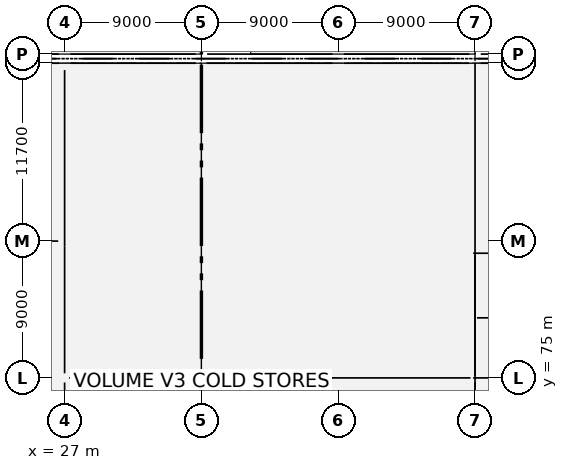
"""IFC4 building model, lengths in metres.
Left out: names, types, materials, properties, quantities, classifications, styles, units other than length and angle.
Written with IfcOpenShell. Run it as: python <this file> out.ifc"""

import sys

from ifc_helpers import new_model, si_unit, direction, frame, frame_2d, origin, origin_2d, place, context, subcontext, project, spatial, rectangle, extrude, element, fill, save


model = new_model("IFC4")
c1 = context("Model", 3, precision=1e-05, world=origin(), true_north=direction((0.0, 1.0)))
c2 = subcontext(c1, "Body", "Model", "MODEL_VIEW")
j1 = project(units=[si_unit("LENGTHUNIT", "METRE"), si_unit("PLANEANGLEUNIT", "RADIAN")], contexts=[c1])
p1 = place(None, origin())
s1 = spatial("IfcSite", under=j1, at=p1, CompositionType="ELEMENT")
p2 = place(p1, origin())
s2 = spatial("IfcBuilding", under=s1, at=p2, CompositionType="ELEMENT")
p3 = place(p2, origin())
s3 = spatial("IfcBuildingStorey", under=s2, at=p3, CompositionType="ELEMENT", Elevation=0.0)
for number, where, z_axis, x_axis in (
    (1, (27.0, 75.0, -0.5), (0.0, 0.0, 1.0), (1.0, 0.0, 0.0)),
    (2, (27.0, 84.0, -0.5), (0.0, 0.0, 1.0), (1.0, 0.0, 0.0)),
):
    element("IfcColumn", number, at=place(p3, frame(where, z_axis=z_axis, x_axis=x_axis)), inside=s3, PredefinedType="COLUMN", context=c2, shape_type="SweptSolid", body=[
        extrude(rectangle(XDim=0.75, YDim=0.75, at=origin_2d()), origin(), (0.0, 0.0, 1.0), 6.8),
    ])
for number, where, z_axis, x_axis in (
    (3, (27.0, 95.7, -0.5), (0.0, 0.0, 1.0), (1.0, 0.0, 0.0)),
    (4, (27.0, 96.3, -0.5), (0.0, 0.0, 1.0), (1.0, 0.0, 0.0)),
):
    element("IfcColumn", number, at=place(p3, frame(where, z_axis=z_axis, x_axis=x_axis)), inside=s3, PredefinedType="COLUMN", context=c2, shape_type="SweptSolid", body=[
        extrude(rectangle(XDim=0.75, YDim=0.55, at=origin_2d()), origin(), (0.0, 0.0, 1.0), 6.8),
    ])
for number, where, z_axis, x_axis in (
    (5, (36.0, 75.0, -0.5), (0.0, 0.0, 1.0), (1.0, 0.0, 0.0)),
    (6, (36.0, 84.0, -0.5), (0.0, 0.0, 1.0), (1.0, 0.0, 0.0)),
):
    element("IfcColumn", number, at=place(p3, frame(where, z_axis=z_axis, x_axis=x_axis)), inside=s3, PredefinedType="COLUMN", context=c2, shape_type="SweptSolid", body=[
        extrude(rectangle(XDim=0.75, YDim=0.75, at=origin_2d()), origin(), (0.0, 0.0, 1.0), 6.8),
    ])
for number, where, z_axis, x_axis in (
    (7, (36.0, 95.7, -0.5), (0.0, 0.0, 1.0), (1.0, 0.0, 0.0)),
    (8, (36.0, 96.3, -0.5), (0.0, 0.0, 1.0), (1.0, 0.0, 0.0)),
):
    element("IfcColumn", number, at=place(p3, frame(where, z_axis=z_axis, x_axis=x_axis)), inside=s3, PredefinedType="COLUMN", context=c2, shape_type="SweptSolid", body=[
        extrude(rectangle(XDim=0.75, YDim=0.55, at=origin_2d()), origin(), (0.0, 0.0, 1.0), 6.8),
    ])
for number, where, z_axis, x_axis in (
    (9, (45.0, 75.0, -0.5), (0.0, 0.0, 1.0), (1.0, 0.0, 0.0)),
    (10, (45.0, 84.0, -0.5), (0.0, 0.0, 1.0), (1.0, 0.0, 0.0)),
):
    element("IfcColumn", number, at=place(p3, frame(where, z_axis=z_axis, x_axis=x_axis)), inside=s3, PredefinedType="COLUMN", context=c2, shape_type="SweptSolid", body=[
        extrude(rectangle(XDim=0.75, YDim=0.75, at=origin_2d()), origin(), (0.0, 0.0, 1.0), 6.8),
    ])
for number, where, z_axis, x_axis in (
    (11, (45.0, 95.7, -0.5), (0.0, 0.0, 1.0), (1.0, 0.0, 0.0)),
    (12, (45.0, 96.3, -0.5), (0.0, 0.0, 1.0), (1.0, 0.0, 0.0)),
):
    element("IfcColumn", number, at=place(p3, frame(where, z_axis=z_axis, x_axis=x_axis)), inside=s3, PredefinedType="COLUMN", context=c2, shape_type="SweptSolid", body=[
        extrude(rectangle(XDim=0.75, YDim=0.55, at=origin_2d()), origin(), (0.0, 0.0, 1.0), 6.8),
    ])
for number, where, z_axis, x_axis in (
    (13, (54.0, 75.0, -0.5), (0.0, 0.0, 1.0), (1.0, 0.0, 0.0)),
    (14, (54.0, 84.0, -0.5), (0.0, 0.0, 1.0), (1.0, 0.0, 0.0)),
):
    element("IfcColumn", number, at=place(p3, frame(where, z_axis=z_axis, x_axis=x_axis)), inside=s3, PredefinedType="COLUMN", context=c2, shape_type="SweptSolid", body=[
        extrude(rectangle(XDim=0.75, YDim=0.75, at=origin_2d()), origin(), (0.0, 0.0, 1.0), 6.8),
    ])
for number, where, z_axis, x_axis in (
    (15, (54.0, 95.7, -0.5), (0.0, 0.0, 1.0), (1.0, 0.0, 0.0)),
    (16, (54.0, 96.3, -0.5), (0.0, 0.0, 1.0), (1.0, 0.0, 0.0)),
):
    element("IfcColumn", number, at=place(p3, frame(where, z_axis=z_axis, x_axis=x_axis)), inside=s3, PredefinedType="COLUMN", context=c2, shape_type="SweptSolid", body=[
        extrude(rectangle(XDim=0.75, YDim=0.55, at=origin_2d()), origin(), (0.0, 0.0, 1.0), 6.8),
    ])
for number, where, z_axis, x_axis in (
    (17, (18.375, 95.7, 0.0), (0.0, 0.0, 1.0), (1.0, 0.0, 0.0)),
    (18, (27.375, 95.7, 0.0), (0.0, 0.0, 1.0), (1.0, 0.0, 0.0)),
    (19, (36.375, 95.7, 0.0), (0.0, 0.0, 1.0), (1.0, 0.0, 0.0)),
    (20, (45.375, 95.7, 0.0), (0.0, 0.0, 1.0), (1.0, 0.0, 0.0)),
    (21, (54.375, 95.7, 0.0), (0.0, 0.0, 1.0), (1.0, 0.0, 0.0)),
):
    element("IfcWall", number, at=place(p3, frame(where, z_axis=z_axis, x_axis=x_axis)), inside=s3, PredefinedType="SOLIDWALL", context=c2, shape_type="SweptSolid", body=[
        extrude(rectangle(XDim=8.25, YDim=0.38, at=frame_2d((4.125, 0.0))), origin(), (0.0, 0.0, 1.0), 5.08),
    ])
p4 = place(p3, frame((18.375, 96.3, 0.0), z_axis=(0.0, 0.0, 1.0), x_axis=(1.0, 0.0, 0.0)))
e22 = element("IfcWall", 22, at=p4, inside=s3, PredefinedType="SOLIDWALL", context=c2, shape_type="SweptSolid", body=[
    extrude(rectangle(XDim=8.25, YDim=0.38, at=frame_2d((4.125, 0.0))), origin(), (0.0, 0.0, 1.0), 5.08),
])
p5 = place(p4, frame((3.325, 0.0, 3.59)))
e23 = element("IfcOpeningElement", 23, at=p5, cuts=e22, PredefinedType="OPENING", context=c2, shape_type="SweptSolid", body=[
    extrude(rectangle(XDim=1.6, YDim=1.45, at=frame_2d((0.8, 0.725))), frame((0.0, 0.2, 0.0), z_axis=(0.0, -1.0, 0.0), x_axis=(1.0, 0.0, 0.0)), (0.0, 0.0, 1.0), 0.4),
])
p6 = place(p3, frame((27.375, 96.3, 0.0), z_axis=(0.0, 0.0, 1.0), x_axis=(1.0, 0.0, 0.0)))
e24 = element("IfcWall", 24, at=p6, inside=s3, PredefinedType="SOLIDWALL", context=c2, shape_type="SweptSolid", body=[
    extrude(rectangle(XDim=8.25, YDim=0.38, at=frame_2d((4.125, 0.0))), origin(), (0.0, 0.0, 1.0), 5.08),
])
p7 = place(p3, frame((36.375, 96.3, 0.0), z_axis=(0.0, 0.0, 1.0), x_axis=(1.0, 0.0, 0.0)))
e25 = element("IfcWall", 25, at=p7, inside=s3, PredefinedType="SOLIDWALL", context=c2, shape_type="SweptSolid", body=[
    extrude(rectangle(XDim=8.25, YDim=0.38, at=frame_2d((4.125, 0.0))), origin(), (0.0, 0.0, 1.0), 5.08),
])
p8 = place(p7, frame((3.325, 0.0, 3.34)))
e26 = element("IfcOpeningElement", 26, at=p8, cuts=e25, PredefinedType="OPENING", context=c2, shape_type="SweptSolid", body=[
    extrude(rectangle(XDim=1.6, YDim=1.45, at=frame_2d((0.8, 0.725))), frame((0.0, 0.2, 0.0), z_axis=(0.0, -1.0, 0.0), x_axis=(1.0, 0.0, 0.0)), (0.0, 0.0, 1.0), 0.4),
])
p9 = place(p3, frame((45.375, 96.3, 0.0), z_axis=(0.0, 0.0, 1.0), x_axis=(1.0, 0.0, 0.0)))
e27 = element("IfcWall", 27, at=p9, inside=s3, PredefinedType="SOLIDWALL", context=c2, shape_type="SweptSolid", body=[
    extrude(rectangle(XDim=8.25, YDim=0.38, at=frame_2d((4.125, 0.0))), origin(), (0.0, 0.0, 1.0), 5.08),
])
p10 = place(p3, frame((54.375, 96.3, 0.0), z_axis=(0.0, 0.0, 1.0), x_axis=(1.0, 0.0, 0.0)))
e28 = element("IfcWall", 28, at=p10, inside=s3, PredefinedType="SOLIDWALL", context=c2, shape_type="SweptSolid", body=[
    extrude(rectangle(XDim=8.25, YDim=0.38, at=frame_2d((4.125, 0.0))), origin(), (0.0, 0.0, 1.0), 5.08),
])
p11 = place(p10, frame((3.325, 0.0, 3.59)))
e29 = element("IfcOpeningElement", 29, at=p11, cuts=e28, PredefinedType="OPENING", context=c2, shape_type="SweptSolid", body=[
    extrude(rectangle(XDim=1.6, YDim=1.45, at=frame_2d((0.8, 0.725))), frame((0.0, 0.2, 0.0), z_axis=(0.0, -1.0, 0.0), x_axis=(1.0, 0.0, 0.0)), (0.0, 0.0, 1.0), 0.4),
])
p12 = place(p3, frame((53.875, 75.0, -0.5), z_axis=(0.0, 0.0, 1.0), x_axis=(1.0, 0.0, 0.0)))
e30 = element("IfcWall", 30, at=p12, inside=s3, PredefinedType="SOLIDWALL", context=c2, shape_type="SweptSolid", body=[
    extrude(rectangle(XDim=9.25, YDim=0.25, at=frame_2d((4.625, 0.0))), origin(), (0.0, 0.0, 1.0), 6.8),
])
p13 = place(p3, frame((53.875, 83.2, -0.5), z_axis=(0.0, 0.0, 1.0), x_axis=(1.0, 0.0, 0.0)))
e31 = element("IfcWall", 31, at=p13, inside=s3, PredefinedType="SOLIDWALL", context=c2, shape_type="SweptSolid", body=[
    extrude(rectangle(XDim=9.25, YDim=0.25, at=frame_2d((4.625, 0.0))), origin(), (0.0, 0.0, 1.0), 6.8),
])
p14 = place(p13, frame((5.775, 0.0, 0.5)))
e32 = element("IfcOpeningElement", 32, at=p14, cuts=e31, PredefinedType="OPENING", context=c2, shape_type="SweptSolid", body=[
    extrude(rectangle(XDim=1.6, YDim=2.2, at=frame_2d((0.8, 1.1))), frame((0.0, 0.135, 0.0), z_axis=(0.0, -1.0, 0.0), x_axis=(1.0, 0.0, 0.0)), (0.0, 0.0, 1.0), 0.27),
])
p15 = place(p3, frame((54.0, 75.125, -0.5), z_axis=(0.0, 0.0, 1.0), x_axis=(0.0, 1.0, 0.0)))
e33 = element("IfcWall", 33, at=p15, inside=s3, PredefinedType="SOLIDWALL", context=c2, shape_type="SweptSolid", body=[
    extrude(rectangle(XDim=7.95, YDim=0.25, at=frame_2d((3.975, 0.0))), origin(), (0.0, 0.0, 1.0), 6.8),
])
p16 = place(p15, frame((1.15, 0.0, 0.5)))
e34 = element("IfcOpeningElement", 34, at=p16, cuts=e33, PredefinedType="OPENING", context=c2, shape_type="SweptSolid", body=[
    extrude(rectangle(XDim=1.2, YDim=2.2, at=frame_2d((0.6, 1.1))), frame((0.0, 0.135, 0.0), z_axis=(0.0, -1.0, 0.0), x_axis=(1.0, 0.0, 0.0)), (0.0, 0.0, 1.0), 0.27),
])
p17 = place(p3, frame((54.125, 78.95, -0.5), z_axis=(0.0, 0.0, 1.0), x_axis=(1.0, 0.0, 0.0)))
e35 = element("IfcWall", 35, at=p17, inside=s3, PredefinedType="SOLIDWALL", context=c2, shape_type="SweptSolid", body=[
    extrude(rectangle(XDim=8.75, YDim=0.25, at=frame_2d((4.375, 0.0))), origin(), (0.0, 0.0, 1.0), 6.8),
])
p18 = place(p3, frame((18.42, 84.0, -0.5), z_axis=(0.0, 0.0, 1.0), x_axis=(1.0, 0.0, 0.0)))
e36 = element("IfcWall", 36, at=p18, inside=s3, PredefinedType="SHEAR", context=c2, shape_type="SweptSolid", body=[
    extrude(rectangle(XDim=8.16, YDim=0.33, at=frame_2d((4.08, 0.0))), origin(), (0.0, 0.0, 1.0), 6.48),
])
p19 = place(p3, frame((27.0, 72.2, 0.0), z_axis=(0.0, 0.0, 1.0), x_axis=(0.0, 1.0, 0.0)))
e37 = element("IfcWall", 37, at=p19, inside=s3, PredefinedType="PARTITIONING", context=c2, shape_type="SweptSolid", body=[
    extrude(rectangle(XDim=2.5, YDim=0.1, at=frame_2d((1.25, 0.0))), origin(), (0.0, 0.0, 1.0), 5.18),
])
p20 = place(p19, frame((0.78, 0.0, 0.0)))
e38 = element("IfcOpeningElement", 38, at=p20, cuts=e37, PredefinedType="OPENING", context=c2, shape_type="SweptSolid", body=[
    extrude(rectangle(XDim=0.94, YDim=2.14, at=frame_2d((0.47, 1.07))), frame((0.0, 0.06, 0.0), z_axis=(0.0, -1.0, 0.0), x_axis=(1.0, 0.0, 0.0)), (0.0, 0.0, 1.0), 0.12),
])
p21 = place(p3, frame((27.0, 75.3, 0.0), z_axis=(0.0, 0.0, 1.0), x_axis=(0.0, 1.0, 0.0)))
e39 = element("IfcWall", 39, at=p21, inside=s3, PredefinedType="STANDARD", context=c2, shape_type="SweptSolid", body=[
    extrude(rectangle(XDim=8.325, YDim=0.195, at=frame_2d((4.163, 0.0))), origin(), (0.0, 0.0, 1.0), 5.18),
])
p22 = place(p3, frame((27.3, 75.0, 0.0), z_axis=(0.0, 0.0, 1.0), x_axis=(1.0, 0.0, 0.0)))
e40 = element("IfcWall", 40, at=p22, inside=s3, PredefinedType="STANDARD", context=c2, shape_type="SweptSolid", body=[
    extrude(rectangle(XDim=26.4, YDim=0.195, at=frame_2d((13.2, 0.0))), origin(), (0.0, 0.0, 1.0), 5.13),
])
p23 = place(p22, frame((12.125, 0.0, 0.0)))
e41 = element("IfcOpeningElement", 41, at=p23, cuts=e40, PredefinedType="OPENING", context=c2, shape_type="SweptSolid", body=[
    extrude(rectangle(XDim=2.15, YDim=2.55, at=frame_2d((1.075, 1.275))), frame((0.0, 0.107, 0.0), z_axis=(0.0, -1.0, 0.0), x_axis=(1.0, 0.0, 0.0)), (0.0, 0.0, 1.0), 0.215),
])
p24 = place(p3, frame((54.0, 72.2, 0.0), z_axis=(0.0, 0.0, 1.0), x_axis=(0.0, 1.0, 0.0)))
e42 = element("IfcWall", 42, at=p24, inside=s3, PredefinedType="PARTITIONING", context=c2, shape_type="SweptSolid", body=[
    extrude(rectangle(XDim=2.5, YDim=0.14, at=frame_2d((1.25, 0.0))), origin(), (0.0, 0.0, 1.0), 5.18),
])
p25 = place(p24, frame((0.78, 0.0, 0.0)))
e43 = element("IfcOpeningElement", 43, at=p25, cuts=e42, PredefinedType="OPENING", context=c2, shape_type="SweptSolid", body=[
    extrude(rectangle(XDim=0.94, YDim=2.14, at=frame_2d((0.47, 1.07))), frame((0.0, 0.08, 0.0), z_axis=(0.0, -1.0, 0.0), x_axis=(1.0, 0.0, 0.0)), (0.0, 0.0, 1.0), 0.16),
])
p26 = place(p3, frame((27.0, 83.625, 0.0), z_axis=(0.0, 0.0, 1.0), x_axis=(0.0, 1.0, 0.0)))
e44 = element("IfcWall", 44, at=p26, inside=s3, PredefinedType="STANDARD", context=c2, shape_type="SweptSolid", body=[
    extrude(rectangle(XDim=11.625, YDim=0.195, at=frame_2d((5.812, 0.0))), origin(), (0.0, 0.0, 1.0), 4.83),
])
p27 = place(p26, frame((5.15, 0.0, 0.0)))
e45 = element("IfcOpeningElement", 45, at=p27, cuts=e44, PredefinedType="OPENING", context=c2, shape_type="SweptSolid", body=[
    extrude(rectangle(XDim=1.7, YDim=2.4, at=frame_2d((0.85, 1.2))), frame((0.0, 0.107, 0.0), z_axis=(0.0, -1.0, 0.0), x_axis=(1.0, 0.0, 0.0)), (0.0, 0.0, 1.0), 0.215),
])
p28 = place(p8, origin())
e46 = element("IfcWindow", 46, at=p28, inside=s3, PartitioningType="DOUBLE_PANEL_HORIZONTAL", PredefinedType="WINDOW", context=c2, shape_type="SweptSolid", body=[
    extrude(rectangle(XDim=1.6, YDim=1.45, at=frame_2d((0.8, 0.725))), frame((0.0, 0.03, 0.0), z_axis=(0.0, -1.0, 0.0), x_axis=(1.0, 0.0, 0.0)), (0.0, 0.0, 1.0), 0.06),
])
fill(e26, e46)
p29 = place(p16, origin())
e47 = element("IfcDoor", 47, at=p29, inside=s3, OperationType="SINGLE_SWING_LEFT", PredefinedType="DOOR", context=c2, shape_type="SweptSolid", body=[
    extrude(rectangle(XDim=1.2, YDim=2.2, at=frame_2d((0.6, 1.1))), frame((0.0, 0.025, 0.0), z_axis=(0.0, -1.0, 0.0), x_axis=(1.0, 0.0, 0.0)), (0.0, 0.0, 1.0), 0.05),
])
fill(e34, e47)
p30 = place(p27, origin())
e48 = element("IfcDoor", 48, at=p30, inside=s3, OperationType="SLIDING_TO_LEFT", PredefinedType="DOOR", context=c2, shape_type="SweptSolid", body=[
    extrude(rectangle(XDim=1.7, YDim=2.4, at=frame_2d((0.85, 1.2))), frame((0.0, 0.025, 0.0), z_axis=(0.0, -1.0, 0.0), x_axis=(1.0, 0.0, 0.0)), (0.0, 0.0, 1.0), 0.05),
])
fill(e45, e48)
p31 = place(p23, origin())
e49 = element("IfcDoor", 49, at=p31, inside=s3, OperationType="SLIDING_TO_LEFT", PredefinedType="DOOR", context=c2, shape_type="SweptSolid", body=[
    extrude(rectangle(XDim=2.15, YDim=2.55, at=frame_2d((1.075, 1.275))), frame((0.0, 0.025, 0.0), z_axis=(0.0, -1.0, 0.0), x_axis=(1.0, 0.0, 0.0)), (0.0, 0.0, 1.0), 0.05),
])
fill(e41, e49)
save(model, sys.argv[1])
